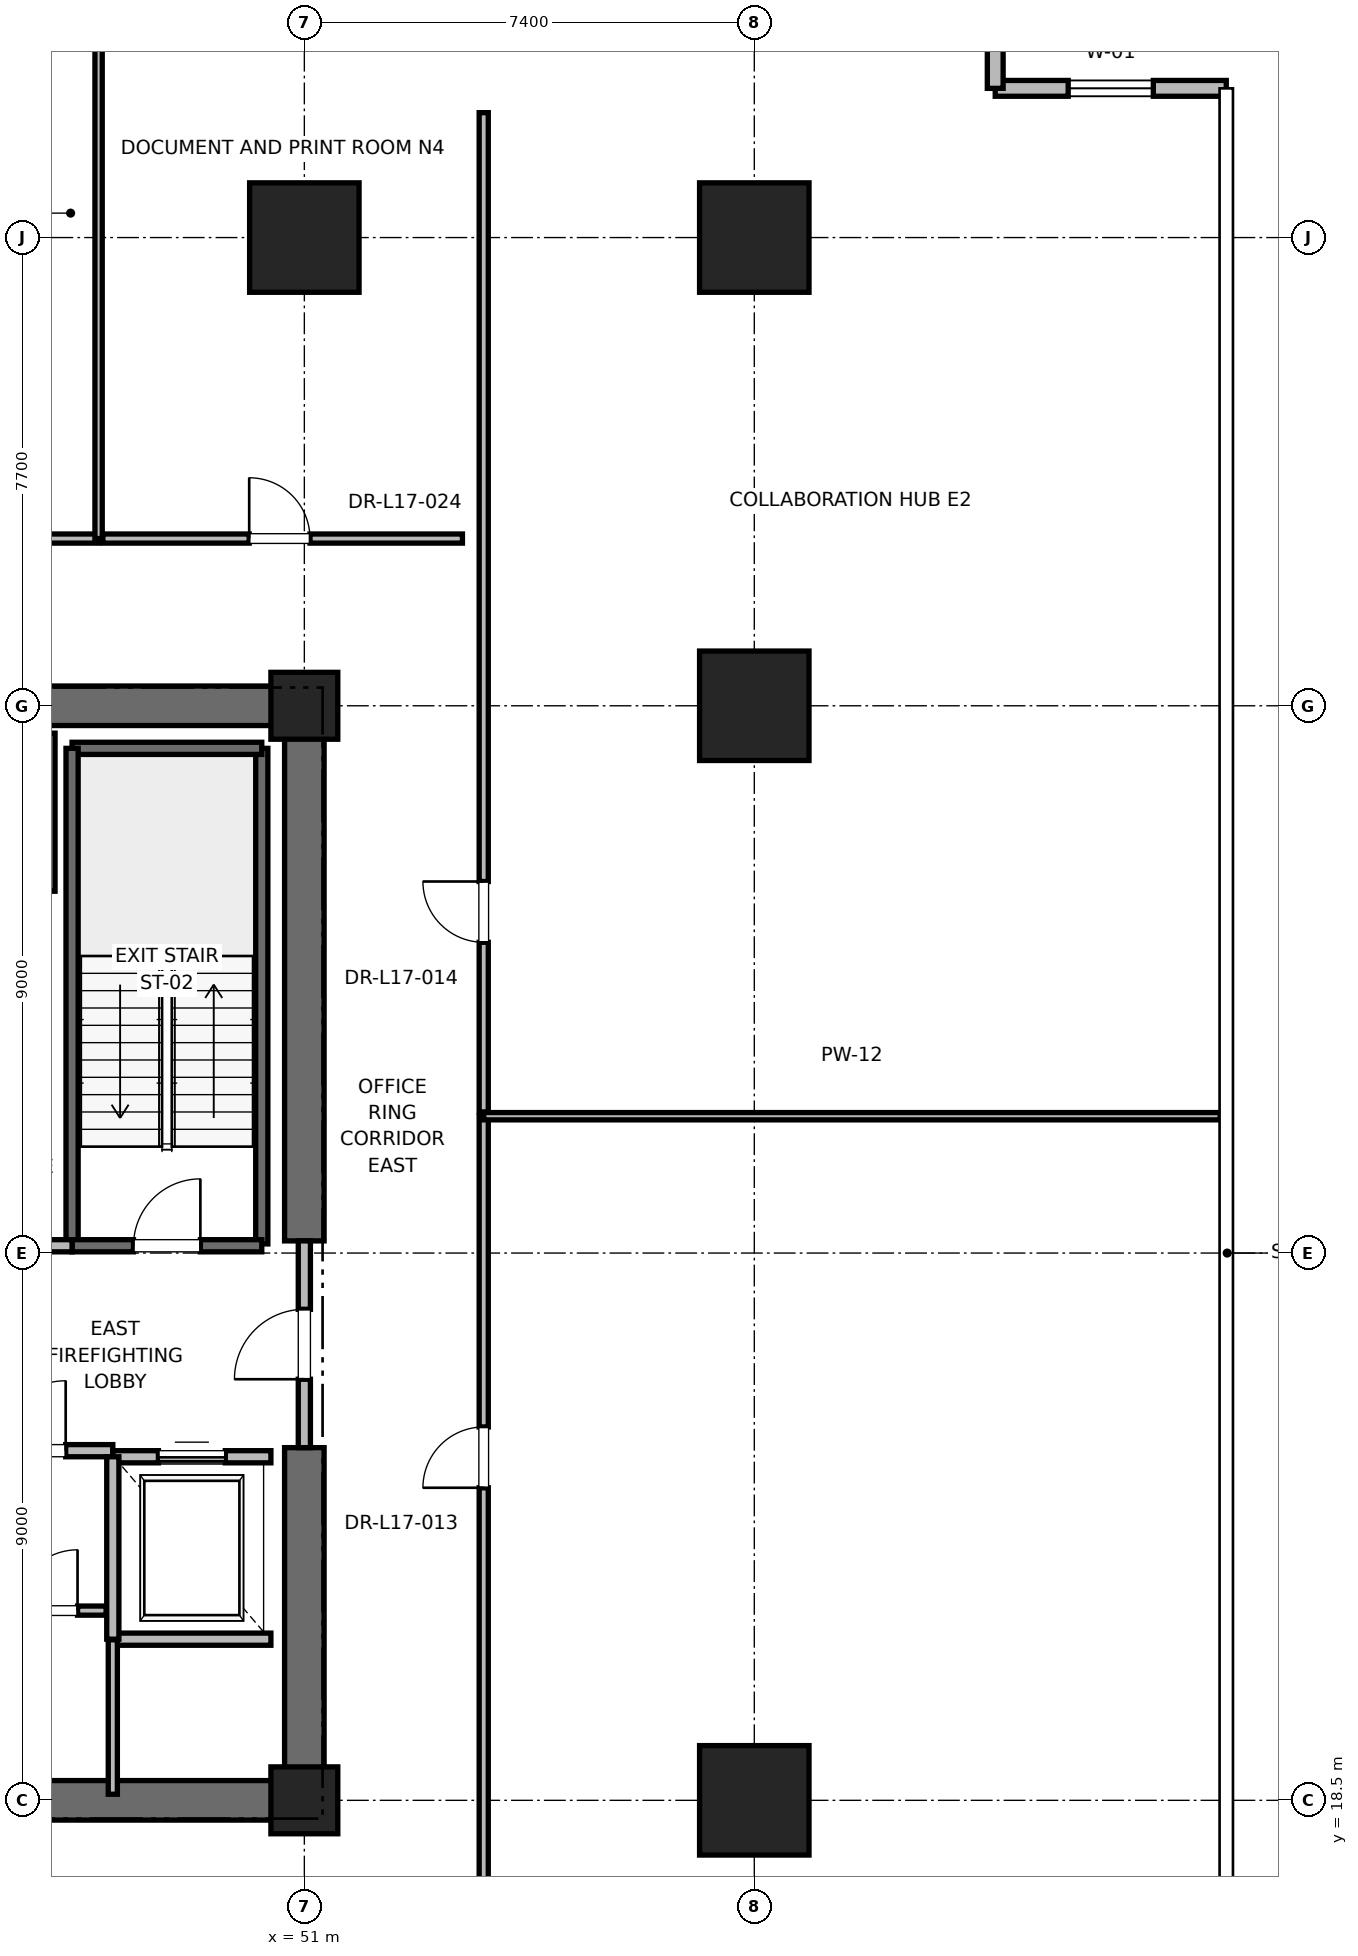
"""IFC4 building model, lengths in metres.
Left out: names, types, materials, properties, quantities, classifications, styles, units other than length and angle.
Written with IfcOpenShell. Run it as: python <this file> out.ifc"""

import sys

from ifc_helpers import new_model, si_unit, direction, frame, frame_2d, origin, origin_2d, place, context, subcontext, project, spatial, rectangle, extrude, element, fill, save


model = new_model("IFC4")
c1 = context("Model", 3, precision=1e-05, world=origin(), true_north=direction((0.0, 1.0)))
c2 = subcontext(c1, "Body", "Model", "MODEL_VIEW")
j1 = project(units=[si_unit("LENGTHUNIT", "METRE"), si_unit("PLANEANGLEUNIT", "RADIAN")], contexts=[c1])
p1 = place(None, origin())
s1 = spatial("IfcSite", under=j1, at=p1, CompositionType="ELEMENT")
p2 = place(p1, origin())
s2 = spatial("IfcBuilding", under=s1, at=p2, CompositionType="ELEMENT")
p3 = place(p2, frame((0.0, 0.0, 75.6)))
s3 = spatial("IfcBuildingStorey", under=s2, at=p3, CompositionType="ELEMENT", Elevation=75.6)
for number, where, z_axis, x_axis in (
    (1, (51.0, 44.2, 0.0), (0.0, 0.0, 1.0), (1.0, 0.0, 0.0)),
    (2, (58.4, 18.5, 0.0), (0.0, 0.0, 1.0), (1.0, 0.0, 0.0)),
    (3, (58.4, 36.5, 0.0), (0.0, 0.0, 1.0), (1.0, 0.0, 0.0)),
    (4, (58.4, 44.2, 0.0), (0.0, 0.0, 1.0), (1.0, 0.0, 0.0)),
):
    element("IfcColumn", number, at=place(p3, frame(where, z_axis=z_axis, x_axis=x_axis)), inside=s3, PredefinedType="COLUMN", context=c2, shape_type="SweptSolid", body=[
        extrude(rectangle(XDim=1.8, YDim=1.8, at=origin_2d()), origin(), (0.0, 0.0, 1.0), 4.0),
    ])
for number, where, z_axis, x_axis in (
    (5, (51.0, 18.5, 0.0), (0.0, 0.0, 1.0), (1.0, 0.0, 0.0)),
    (6, (51.0, 36.5, 0.0), (0.0, 0.0, 1.0), (1.0, 0.0, 0.0)),
):
    element("IfcColumn", number, at=place(p3, frame(where, z_axis=z_axis, x_axis=x_axis)), inside=s3, PredefinedType="PILASTER", context=c2, shape_type="SweptSolid", body=[
        extrude(rectangle(XDim=1.1, YDim=1.1, at=origin_2d()), origin(), (0.0, 0.0, 1.0), 4.0),
    ])
p4 = place(p3, frame((41.8, 18.5, 0.0), z_axis=(0.0, 0.0, 1.0), x_axis=(1.0, 0.0, 0.0)))
e7 = element("IfcWall", 7, at=p4, inside=s3, PredefinedType="SHEAR", context=c2, shape_type="SweptSolid", body=[
    extrude(rectangle(XDim=9.2, YDim=0.65, at=frame_2d((4.6, 0.0))), origin(), (0.0, 0.0, 1.0), 3.76),
])
for number, where, z_axis, x_axis in (
    (8, (45.2, 36.5, 0.0), (0.0, 0.0, 1.0), (1.0, 0.0, 0.0)),
    (9, (51.0, 18.5, 0.0), (0.0, 0.0, 1.0), (0.0, 1.0, 0.0)),
):
    element("IfcWall", number, at=place(p3, frame(where, z_axis=z_axis, x_axis=x_axis)), inside=s3, PredefinedType="SHEAR", context=c2, shape_type="SweptSolid", body=[
        extrude(rectangle(XDim=5.8, YDim=0.65, at=frame_2d((2.9, 0.0))), origin(), (0.0, 0.0, 1.0), 3.76),
    ])
p5 = place(p3, frame((51.0, 27.7, 0.0), z_axis=(0.0, 0.0, 1.0), x_axis=(0.0, 1.0, 0.0)))
e10 = element("IfcWall", 10, at=p5, inside=s3, PredefinedType="SHEAR", context=c2, shape_type="SweptSolid", body=[
    extrude(rectangle(XDim=8.8, YDim=0.65, at=frame_2d((4.4, 0.0))), origin(), (0.0, 0.0, 1.0), 3.76),
])
p6 = place(p3, frame((66.162, 46.654, 0.0), z_axis=(0.0, 0.0, 1.0), x_axis=(-1.0, 0.0, 0.0)))
e11 = element("IfcWall", 11, at=p6, inside=s3, PredefinedType="PARAPET", context=c2, shape_type="SweptSolid", body=[
    extrude(rectangle(XDim=3.8, YDim=0.26, at=frame_2d((1.9, 0.0))), origin(), (0.0, 0.0, 1.0), 3.76),
])
p7 = place(p6, frame((1.2, 0.0, 0.85)))
e12 = element("IfcOpeningElement", 12, at=p7, cuts=e11, PredefinedType="OPENING", context=c2, shape_type="SweptSolid", body=[
    extrude(rectangle(XDim=1.4, YDim=2.0, at=frame_2d((0.7, 1.0))), frame((0.0, 0.13, 0.0), z_axis=(0.0, -1.0, 0.0), x_axis=(1.0, 0.0, 0.0)), (0.0, 0.0, 1.0), 0.26),
])
p8 = place(p3, frame((62.362, 46.654, 0.0), z_axis=(0.0, 0.0, 1.0), x_axis=(0.0, 1.0, 0.0)))
e13 = element("IfcWall", 13, at=p8, inside=s3, PredefinedType="PARAPET", context=c2, shape_type="SweptSolid", body=[
    extrude(rectangle(XDim=3.4, YDim=0.26, at=frame_2d((1.7, 0.0))), origin(), (0.0, 0.0, 1.0), 3.76),
])
p9 = place(p3, frame((50.3, 27.65, 0.0), z_axis=(0.0, 0.0, 1.0), x_axis=(0.0, 1.0, 0.0)))
e14 = element("IfcWall", 14, at=p9, inside=s3, PredefinedType="SOLIDWALL", context=c2, shape_type="SweptSolid", body=[
    extrude(rectangle(XDim=8.15, YDim=0.2, at=frame_2d((4.075, 0.0))), origin(), (0.0, 0.0, 1.0), 3.76),
])
p10 = place(p3, frame((47.18, 35.8, 0.0), z_axis=(0.0, 0.0, 1.0), x_axis=(1.0, 0.0, 0.0)))
e15 = element("IfcWall", 15, at=p10, inside=s3, PredefinedType="SOLIDWALL", context=c2, shape_type="SweptSolid", body=[
    extrude(rectangle(XDim=3.12, YDim=0.2, at=frame_2d((1.56, 0.0))), origin(), (0.0, 0.0, 1.0), 3.76),
])
p11 = place(p3, frame((47.18, 27.62, 0.0), z_axis=(0.0, 0.0, 1.0), x_axis=(0.0, 1.0, 0.0)))
e16 = element("IfcWall", 16, at=p11, inside=s3, PredefinedType="SOLIDWALL", context=c2, shape_type="SweptSolid", body=[
    extrude(rectangle(XDim=8.18, YDim=0.2, at=frame_2d((4.09, 0.0))), origin(), (0.0, 0.0, 1.0), 3.76),
])
p12 = place(p3, frame((47.18, 27.62, 0.0), z_axis=(0.0, 0.0, 1.0), x_axis=(1.0, 0.0, 0.0)))
e17 = element("IfcWall", 17, at=p12, inside=s3, PredefinedType="SOLIDWALL", context=c2, shape_type="SweptSolid", body=[
    extrude(rectangle(XDim=3.12, YDim=0.2, at=frame_2d((1.56, 0.0))), origin(), (0.0, 0.0, 1.0), 3.76),
])
p13 = place(p12, frame((1.01, 0.0, 0.0)))
e18 = element("IfcOpeningElement", 18, at=p13, cuts=e17, PredefinedType="OPENING", context=c2, shape_type="SweptSolid", body=[
    extrude(rectangle(XDim=1.1, YDim=2.15, at=frame_2d((0.55, 1.075))), frame((0.0, 0.1, 0.0), z_axis=(0.0, -1.0, 0.0), x_axis=(1.0, 0.0, 0.0)), (0.0, 0.0, 1.0), 0.2),
])
p14 = place(p3, frame((45.15, 24.25, 0.0), z_axis=(0.0, 0.0, 1.0), x_axis=(1.0, 0.0, 0.0)))
e19 = element("IfcWall", 19, at=p14, inside=s3, PredefinedType="PARTITIONING", context=c2, shape_type="SweptSolid", body=[
    extrude(rectangle(XDim=2.7, YDim=0.2, at=frame_2d((1.35, 0.0))), origin(), (0.0, 0.0, 1.0), 3.76),
])
p15 = place(p14, frame((0.775, 0.0, 0.0)))
e20 = element("IfcOpeningElement", 20, at=p15, cuts=e19, PredefinedType="OPENING", context=c2, shape_type="SweptSolid", body=[
    extrude(rectangle(XDim=1.15, YDim=2.2, at=frame_2d((0.575, 1.1))), frame((0.0, 0.1, 0.0), z_axis=(0.0, -1.0, 0.0), x_axis=(1.0, 0.0, 0.0)), (0.0, 0.0, 1.0), 0.2),
])
p16 = place(p3, frame((45.15, 27.62, 0.0), z_axis=(0.0, 0.0, 1.0), x_axis=(1.0, 0.0, 0.0)))
e21 = element("IfcWall", 21, at=p16, inside=s3, PredefinedType="PARTITIONING", context=c2, shape_type="SweptSolid", body=[
    extrude(rectangle(XDim=2.03, YDim=0.2, at=frame_2d((1.015, 0.0))), origin(), (0.0, 0.0, 1.0), 3.76),
])
p17 = place(p16, frame((0.44, 0.0, 0.0)))
e22 = element("IfcOpeningElement", 22, at=p17, cuts=e21, PredefinedType="OPENING", context=c2, shape_type="SweptSolid", body=[
    extrude(rectangle(XDim=1.15, YDim=2.2, at=frame_2d((0.575, 1.1))), frame((0.0, 0.1, 0.0), z_axis=(0.0, -1.0, 0.0), x_axis=(1.0, 0.0, 0.0)), (0.0, 0.0, 1.0), 0.2),
])
p18 = place(p3, frame((51.0, 24.3, 0.0), z_axis=(0.0, 0.0, 1.0), x_axis=(0.0, 1.0, 0.0)))
e23 = element("IfcWall", 23, at=p18, inside=s3, PredefinedType="PARTITIONING", context=c2, shape_type="SweptSolid", body=[
    extrude(rectangle(XDim=3.4, YDim=0.2, at=frame_2d((1.7, 0.0))), origin(), (0.0, 0.0, 1.0), 2.54),
])
p19 = place(p18, frame((1.125, 0.0, 0.0)))
e24 = element("IfcOpeningElement", 24, at=p19, cuts=e23, PredefinedType="OPENING", context=c2, shape_type="SweptSolid", body=[
    extrude(rectangle(XDim=1.15, YDim=2.2, at=frame_2d((0.575, 1.1))), frame((0.0, 0.1, 0.0), z_axis=(0.0, -1.0, 0.0), x_axis=(1.0, 0.0, 0.0)), (0.0, 0.0, 1.0), 0.2),
])
p20 = place(p3, frame((47.85, 21.15, 0.0), z_axis=(0.0, 0.0, 1.0), x_axis=(1.0, 0.0, 0.0)))
e25 = element("IfcWall", 25, at=p20, inside=s3, PredefinedType="SOLIDWALL", context=c2, shape_type="SweptSolid", body=[
    extrude(rectangle(XDim=2.6, YDim=0.2, at=frame_2d((1.3, 0.0))), origin(), (0.0, 0.0, 1.0), 3.76),
])
p21 = place(p3, frame((50.45, 24.15, 0.0), z_axis=(0.0, 0.0, 1.0), x_axis=(-1.0, 0.0, 0.0)))
e26 = element("IfcWall", 26, at=p21, inside=s3, PredefinedType="SOLIDWALL", context=c2, shape_type="SweptSolid", body=[
    extrude(rectangle(XDim=2.6, YDim=0.2, at=frame_2d((1.3, 0.0))), origin(), (0.0, 0.0, 1.0), 2.54),
])
p22 = place(p21, frame((0.75, 0.0, 0.0)))
e27 = element("IfcOpeningElement", 27, at=p22, cuts=e26, PredefinedType="OPENING", context=c2, shape_type="SweptSolid", body=[
    extrude(rectangle(XDim=1.1, YDim=2.2, at=frame_2d((0.55, 1.1))), frame((0.0, 0.1, 0.0), z_axis=(0.0, -1.0, 0.0), x_axis=(1.0, 0.0, 0.0)), (0.0, 0.0, 1.0), 0.2),
])
p23 = place(p3, frame((47.85, 24.15, 0.0), z_axis=(0.0, 0.0, 1.0), x_axis=(0.0, -1.0, 0.0)))
e28 = element("IfcWall", 28, at=p23, inside=s3, PredefinedType="SOLIDWALL", context=c2, shape_type="SweptSolid", body=[
    extrude(rectangle(XDim=3.0, YDim=0.2, at=frame_2d((1.5, 0.0))), origin(), (0.0, 0.0, 1.0), 3.76),
])
p24 = place(p3, frame((46.8, 33.45, 0.0), z_axis=(0.0, 0.0, 1.0), x_axis=(0.0, 1.0, 0.0)))
e29 = element("IfcWall", 29, at=p24, inside=s3, PredefinedType="SOLIDWALL", context=c2, shape_type="SweptSolid", body=[
    extrude(rectangle(XDim=2.6, YDim=0.2, at=frame_2d((1.3, 0.0))), origin(), (0.0, 0.0, 1.0), 3.76),
])
p25 = place(p3, frame((47.85, 18.6, 0.0), z_axis=(0.0, 0.0, 1.0), x_axis=(0.0, 1.0, 0.0)))
e30 = element("IfcWall", 30, at=p25, inside=s3, PredefinedType="PARTITIONING", context=c2, shape_type="SweptSolid", body=[
    extrude(rectangle(XDim=2.54, YDim=0.15, at=frame_2d((1.27, 0.0))), origin(), (0.0, 0.0, 1.0), 2.85),
])
p26 = place(p3, frame((45.8, 21.62, 0.0), z_axis=(0.0, 0.0, 1.0), x_axis=(1.0, 0.0, 0.0)))
e31 = element("IfcWall", 31, at=p26, inside=s3, PredefinedType="PARTITIONING", context=c2, shape_type="SweptSolid", body=[
    extrude(rectangle(XDim=1.94, YDim=0.15, at=frame_2d((0.97, 0.0))), origin(), (0.0, 0.0, 1.0), 2.85),
])
p27 = place(p26, frame((0.47, 0.0, 0.0)))
e32 = element("IfcOpeningElement", 32, at=p27, cuts=e31, PredefinedType="OPENING", context=c2, shape_type="SweptSolid", body=[
    extrude(rectangle(XDim=1.0, YDim=2.15, at=frame_2d((0.5, 1.075))), frame((0.0, 0.075, 0.0), z_axis=(0.0, -1.0, 0.0), x_axis=(1.0, 0.0, 0.0)), (0.0, 0.0, 1.0), 0.15),
])
p28 = place(p3, frame((41.158, 39.25, 0.0), z_axis=(0.0, 0.0, 1.0), x_axis=(1.0, 0.0, 0.0)))
e33 = element("IfcWall", 33, at=p28, inside=s3, PredefinedType="PARTITIONING", context=c2, shape_type="SweptSolid", body=[
    extrude(rectangle(XDim=6.458, YDim=0.15, at=frame_2d((3.229, 0.0))), origin(), (0.0, 0.0, 1.0), 2.85),
])
p29 = place(p28, frame((2.694, 0.0, 0.0)))
e34 = element("IfcOpeningElement", 34, at=p29, cuts=e33, PredefinedType="OPENING", context=c2, shape_type="SweptSolid", body=[
    extrude(rectangle(XDim=1.0, YDim=2.15, at=frame_2d((0.5, 1.075))), frame((0.0, 0.075, 0.0), z_axis=(0.0, -1.0, 0.0), x_axis=(1.0, 0.0, 0.0)), (0.0, 0.0, 1.0), 0.15),
])
p30 = place(p3, frame((47.616, 39.25, 0.0), z_axis=(0.0, 0.0, 1.0), x_axis=(0.0, 1.0, 0.0)))
e35 = element("IfcWall", 35, at=p30, inside=s3, PredefinedType="PARTITIONING", context=c2, shape_type="SweptSolid", body=[
    extrude(rectangle(XDim=10.704, YDim=0.12, at=frame_2d((5.352, 0.0))), origin(), (0.0, 0.0, 1.0), 2.39),
])
p31 = place(p3, frame((47.686, 39.25, 0.0), z_axis=(0.0, 0.0, 1.0), x_axis=(1.0, 0.0, 0.0)))
e36 = element("IfcWall", 36, at=p31, inside=s3, PredefinedType="PARTITIONING", context=c2, shape_type="SweptSolid", body=[
    extrude(rectangle(XDim=5.914, YDim=0.15, at=frame_2d((2.957, 0.0))), origin(), (0.0, 0.0, 1.0), 2.85),
])
p32 = place(p31, frame((2.407, 0.0, 0.0)))
e37 = element("IfcOpeningElement", 37, at=p32, cuts=e36, PredefinedType="OPENING", context=c2, shape_type="SweptSolid", body=[
    extrude(rectangle(XDim=1.0, YDim=2.15, at=frame_2d((0.5, 1.075))), frame((0.0, 0.075, 0.0), z_axis=(0.0, -1.0, 0.0), x_axis=(1.0, 0.0, 0.0)), (0.0, 0.0, 1.0), 0.15),
])
p33 = place(p3, frame((53.95, 8.746, 0.0), z_axis=(0.0, 0.0, 1.0), x_axis=(0.0, 1.0, 0.0)))
e38 = element("IfcWall", 38, at=p33, inside=s3, PredefinedType="PARTITIONING", context=c2, shape_type="SweptSolid", body=[
    extrude(rectangle(XDim=21.004, YDim=0.15, at=frame_2d((10.502, 0.0))), origin(), (0.0, 0.0, 1.0), 2.85),
])
p34 = place(p33, frame((14.894, 0.0, 0.0)))
e39 = element("IfcOpeningElement", 39, at=p34, cuts=e38, PredefinedType="OPENING", context=c2, shape_type="SweptSolid", body=[
    extrude(rectangle(XDim=1.0, YDim=2.15, at=frame_2d((0.5, 1.075))), frame((0.0, 0.075, 0.0), z_axis=(0.0, -1.0, 0.0), x_axis=(1.0, 0.0, 0.0)), (0.0, 0.0, 1.0), 0.15),
])
p35 = place(p3, frame((53.95, 29.75, 0.0), z_axis=(0.0, 0.0, 1.0), x_axis=(1.0, 0.0, 0.0)))
e40 = element("IfcWall", 40, at=p35, inside=s3, PredefinedType="PARTITIONING", context=c2, shape_type="SweptSolid", body=[
    extrude(rectangle(XDim=12.113, YDim=0.12, at=frame_2d((6.056, 0.0))), origin(), (0.0, 0.0, 1.0), 2.85),
])
p36 = place(p3, frame((53.95, 29.82, 0.0), z_axis=(0.0, 0.0, 1.0), x_axis=(0.0, 1.0, 0.0)))
e41 = element("IfcWall", 41, at=p36, inside=s3, PredefinedType="PARTITIONING", context=c2, shape_type="SweptSolid", body=[
    extrude(rectangle(XDim=16.433, YDim=0.15, at=frame_2d((8.217, 0.0))), origin(), (0.0, 0.0, 1.0), 2.85),
])
p37 = place(p36, frame((2.79, 0.0, 0.0)))
e42 = element("IfcOpeningElement", 42, at=p37, cuts=e41, PredefinedType="OPENING", context=c2, shape_type="SweptSolid", body=[
    extrude(rectangle(XDim=1.0, YDim=2.15, at=frame_2d((0.5, 1.075))), frame((0.0, 0.075, 0.0), z_axis=(0.0, -1.0, 0.0), x_axis=(1.0, 0.0, 0.0)), (0.0, 0.0, 1.0), 0.15),
])
p38 = place(p7, origin())
e43 = element("IfcWindow", 43, at=p38, inside=s3, PartitioningType="SINGLE_PANEL", PredefinedType="WINDOW", context=c2, shape_type="SweptSolid", body=[
    extrude(rectangle(XDim=1.4, YDim=2.0, at=frame_2d((0.7, 1.0))), frame((0.0, 0.03, 0.0), z_axis=(0.0, -1.0, 0.0), x_axis=(1.0, 0.0, 0.0)), (0.0, 0.0, 1.0), 0.06),
])
fill(e12, e43)
p39 = place(p13, origin())
e44 = element("IfcDoor", 44, at=p39, inside=s3, OperationType="SINGLE_SWING_RIGHT", PredefinedType="DOOR", context=c2, shape_type="SweptSolid", body=[
    extrude(rectangle(XDim=1.1, YDim=2.15, at=frame_2d((0.55, 1.075))), frame((0.0, 0.025, 0.0), z_axis=(0.0, -1.0, 0.0), x_axis=(1.0, 0.0, 0.0)), (0.0, 0.0, 1.0), 0.05),
])
fill(e18, e44)
p40 = place(p15, origin())
e45 = element("IfcDoor", 45, at=p40, inside=s3, OperationType="SINGLE_SWING_RIGHT", PredefinedType="DOOR", context=c2, shape_type="SweptSolid", body=[
    extrude(rectangle(XDim=1.15, YDim=2.2, at=frame_2d((0.575, 1.1))), frame((0.0, 0.025, 0.0), z_axis=(0.0, -1.0, 0.0), x_axis=(1.0, 0.0, 0.0)), (0.0, 0.0, 1.0), 0.05),
])
fill(e20, e45)
p41 = place(p19, origin())
e46 = element("IfcDoor", 46, at=p41, inside=s3, OperationType="SINGLE_SWING_LEFT", PredefinedType="DOOR", context=c2, shape_type="SweptSolid", body=[
    extrude(rectangle(XDim=1.15, YDim=2.2, at=frame_2d((0.575, 1.1))), frame((0.0, 0.025, 0.0), z_axis=(0.0, -1.0, 0.0), x_axis=(1.0, 0.0, 0.0)), (0.0, 0.0, 1.0), 0.05),
])
fill(e24, e46)
p42 = place(p22, origin())
e47 = element("IfcDoor", 47, at=p42, inside=s3, OperationType="SLIDING_TO_RIGHT", PredefinedType="DOOR", context=c2, shape_type="SweptSolid", body=[
    extrude(rectangle(XDim=1.1, YDim=2.2, at=frame_2d((0.55, 1.1))), frame((0.0, 0.025, 0.0), z_axis=(0.0, -1.0, 0.0), x_axis=(1.0, 0.0, 0.0)), (0.0, 0.0, 1.0), 0.05),
])
fill(e27, e47)
p43 = place(p27, origin())
e48 = element("IfcDoor", 48, at=p43, inside=s3, OperationType="SINGLE_SWING_RIGHT", PredefinedType="DOOR", context=c2, shape_type="SweptSolid", body=[
    extrude(rectangle(XDim=1.0, YDim=2.15, at=frame_2d((0.5, 1.075))), frame((0.0, 0.025, 0.0), z_axis=(0.0, -1.0, 0.0), x_axis=(1.0, 0.0, 0.0)), (0.0, 0.0, 1.0), 0.05),
])
fill(e32, e48)
p44 = place(p32, origin())
e49 = element("IfcDoor", 49, at=p44, inside=s3, OperationType="SINGLE_SWING_LEFT", PredefinedType="DOOR", context=c2, shape_type="SweptSolid", body=[
    extrude(rectangle(XDim=1.0, YDim=2.15, at=frame_2d((0.5, 1.075))), frame((0.0, 0.025, 0.0), z_axis=(0.0, -1.0, 0.0), x_axis=(1.0, 0.0, 0.0)), (0.0, 0.0, 1.0), 0.05),
])
fill(e37, e49)
p45 = place(p34, origin())
e50 = element("IfcDoor", 50, at=p45, inside=s3, OperationType="SINGLE_SWING_LEFT", PredefinedType="DOOR", context=c2, shape_type="SweptSolid", body=[
    extrude(rectangle(XDim=1.0, YDim=2.15, at=frame_2d((0.5, 1.075))), frame((0.0, 0.025, 0.0), z_axis=(0.0, -1.0, 0.0), x_axis=(1.0, 0.0, 0.0)), (0.0, 0.0, 1.0), 0.05),
])
fill(e39, e50)
p46 = place(p37, origin())
e51 = element("IfcDoor", 51, at=p46, inside=s3, OperationType="SINGLE_SWING_RIGHT", PredefinedType="DOOR", context=c2, shape_type="SweptSolid", body=[
    extrude(rectangle(XDim=1.0, YDim=2.15, at=frame_2d((0.5, 1.075))), frame((0.0, 0.025, 0.0), z_axis=(0.0, -1.0, 0.0), x_axis=(1.0, 0.0, 0.0)), (0.0, 0.0, 1.0), 0.05),
])
fill(e42, e51)
save(model, sys.argv[1])
